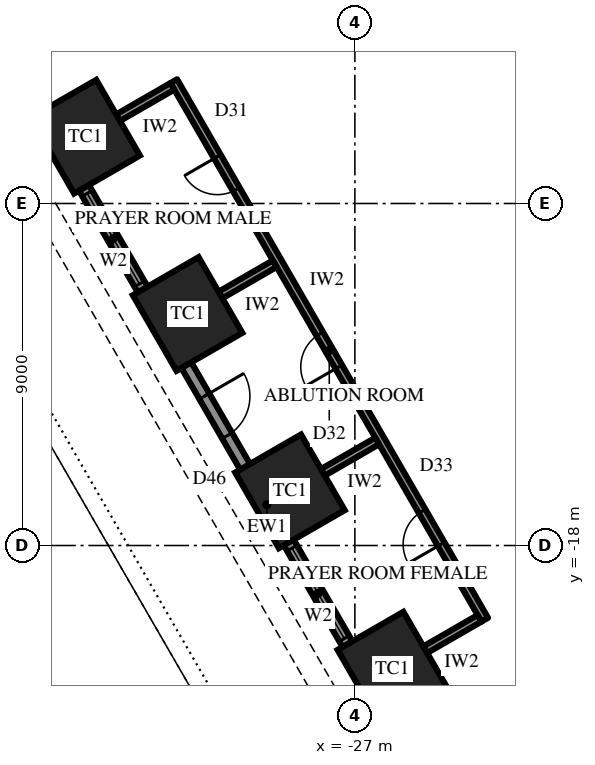
"""IFC4 building model, lengths in metres.
Left out: names, types, materials, properties, quantities, classifications, styles, units other than length and angle.
Written with IfcOpenShell. Run it as: python <this file> out.ifc"""

import sys

from ifc_helpers import new_model, si_unit, direction, frame, frame_2d, origin, origin_2d, place, context, subcontext, project, spatial, rectangle, extrude, element, fill, save


model = new_model("IFC4")
c1 = context("Model", 3, precision=1e-05, world=origin(), true_north=direction((0.0, 1.0)))
c2 = subcontext(c1, "Body", "Model", "MODEL_VIEW")
j1 = project(units=[si_unit("LENGTHUNIT", "METRE"), si_unit("PLANEANGLEUNIT", "RADIAN")], contexts=[c1])
p1 = place(None, origin())
s1 = spatial("IfcSite", under=j1, at=p1, CompositionType="ELEMENT")
p2 = place(p1, origin())
s2 = spatial("IfcBuilding", under=s1, at=p2, CompositionType="ELEMENT")
p3 = place(p2, frame((0.0, 0.0, 23.5)))
s3 = spatial("IfcBuildingStorey", under=s2, at=p3, CompositionType="ELEMENT", Elevation=23.5)
for number, where, z_axis, x_axis in (
    (1, (-34.097, -7.242, 0.0), (0.0, 0.0, 1.0), (0.5, -0.866, 0.0)),
    (2, (-31.403, -11.908, 0.0), (0.0, 0.0, 1.0), (0.5, -0.866, 0.0)),
    (3, (-28.709, -16.575, 0.0), (0.0, 0.0, 1.0), (0.5, -0.866, 0.0)),
    (4, (-26.014, -21.242, 0.0), (0.0, 0.0, 1.0), (0.5, -0.866, 0.0)),
):
    element("IfcColumn", number, at=place(p3, frame(where, z_axis=z_axis, x_axis=x_axis)), inside=s3, PredefinedType="COLUMN", context=c2, shape_type="SweptSolid", body=[
        extrude(rectangle(XDim=2.3, YDim=2.0, at=origin_2d()), origin(), (0.0, 0.0, 1.0), 4.2),
    ])
p4 = place(p3, frame((-37.398, -2.925, 0.0), z_axis=(0.0, 0.0, 1.0), x_axis=(0.499999163675, -0.866025886636, 0.0)))
e5 = element("IfcWall", 5, at=p4, inside=s3, PredefinedType="SOLIDWALL", context=c2, shape_type="SweptSolid", body=[
    extrude(rectangle(XDim=32.332, YDim=0.3, at=frame_2d((16.166, 0.0))), origin(), (0.0, 0.0, 1.0), 2.7),
])
p5 = place(p4, frame((1.319, 0.0, 0.6)))
e6 = element("IfcOpeningElement", 6, at=p5, cuts=e5, PredefinedType="OPENING", context=c2, shape_type="SweptSolid", body=[
    extrude(rectangle(XDim=2.75, YDim=1.85, at=frame_2d((1.375, 0.925))), frame((0.0, 0.16, 0.0), z_axis=(0.0, -1.0, 0.0), x_axis=(1.0, 0.0, 0.0)), (0.0, 0.0, 1.0), 0.32),
])
p6 = place(p4, frame((6.708, 0.0, 0.6)))
e7 = element("IfcOpeningElement", 7, at=p6, cuts=e5, PredefinedType="OPENING", context=c2, shape_type="SweptSolid", body=[
    extrude(rectangle(XDim=2.75, YDim=1.85, at=frame_2d((1.375, 0.925))), frame((0.0, 0.16, 0.0), z_axis=(0.0, -1.0, 0.0), x_axis=(1.0, 0.0, 0.0)), (0.0, 0.0, 1.0), 0.32),
])
p7 = place(p4, frame((12.872, 0.0, 0.0)))
e8 = element("IfcOpeningElement", 8, at=p7, cuts=e5, PredefinedType="OPENING", context=c2, shape_type="SweptSolid", body=[
    extrude(rectangle(XDim=1.2, YDim=2.4, at=frame_2d((0.6, 1.2))), frame((0.0, 0.16, 0.0), z_axis=(0.0, -1.0, 0.0), x_axis=(1.0, 0.0, 0.0)), (0.0, 0.0, 1.0), 0.32),
])
p8 = place(p4, frame((17.485, 0.0, 0.6)))
e9 = element("IfcOpeningElement", 9, at=p8, cuts=e5, PredefinedType="OPENING", context=c2, shape_type="SweptSolid", body=[
    extrude(rectangle(XDim=2.75, YDim=1.85, at=frame_2d((1.375, 0.925))), frame((0.0, 0.16, 0.0), z_axis=(0.0, -1.0, 0.0), x_axis=(1.0, 0.0, 0.0)), (0.0, 0.0, 1.0), 0.32),
])
p9 = place(p4, frame((22.874, 0.0, 0.6)))
e10 = element("IfcOpeningElement", 10, at=p9, cuts=e5, PredefinedType="OPENING", context=c2, shape_type="SweptSolid", body=[
    extrude(rectangle(XDim=2.75, YDim=1.85, at=frame_2d((1.375, 0.925))), frame((0.0, 0.16, 0.0), z_axis=(0.0, -1.0, 0.0), x_axis=(1.0, 0.0, 0.0)), (0.0, 0.0, 1.0), 0.32),
])
p10 = place(p4, frame((28.262, 0.0, 0.6)))
e11 = element("IfcOpeningElement", 11, at=p10, cuts=e5, PredefinedType="OPENING", context=c2, shape_type="SweptSolid", body=[
    extrude(rectangle(XDim=2.75, YDim=1.85, at=frame_2d((1.375, 0.925))), frame((0.0, 0.16, 0.0), z_axis=(0.0, -1.0, 0.0), x_axis=(1.0, 0.0, 0.0)), (0.0, 0.0, 1.0), 0.32),
])
p11 = place(p3, frame((-50.72, -3.95, 0.0), z_axis=(0.0, 0.0, 1.0), x_axis=(0.499998269459, -0.86602640291, 0.0)))
e12 = element("IfcWall", 12, at=p11, inside=s3, PredefinedType="PARAPET", context=c2, shape_type="SweptSolid", body=[
    extrude(rectangle(XDim=43.879, YDim=0.2, at=frame_2d((21.939, 0.0))), origin(), (0.0, 0.0, 1.0), 1.2),
])
p12 = place(p3, frame((-31.766, -5.78, 0.0), z_axis=(0.0, 0.0, 1.0), x_axis=(0.500005677665, -0.866022125758, 0.0)))
e13 = element("IfcWall", 13, at=p12, inside=s3, PredefinedType="PARTITIONING", context=c2, shape_type="SweptSolid", body=[
    extrude(rectangle(XDim=16.366, YDim=0.2, at=frame_2d((8.183, 0.0))), origin(), (0.0, 0.0, 1.0), 4.0),
])
p13 = place(p12, frame((2.294, 0.0, 0.0)))
e14 = element("IfcOpeningElement", 14, at=p13, cuts=e13, PredefinedType="OPENING", context=c2, shape_type="SweptSolid", body=[
    extrude(rectangle(XDim=1.0, YDim=2.2, at=frame_2d((0.5, 1.1))), frame((0.0, 0.11, 0.0), z_axis=(0.0, -1.0, 0.0), x_axis=(1.0, 0.0, 0.0)), (0.0, 0.0, 1.0), 0.22),
])
p14 = place(p12, frame((7.683, 0.0, 0.0)))
e15 = element("IfcOpeningElement", 15, at=p14, cuts=e13, PredefinedType="OPENING", context=c2, shape_type="SweptSolid", body=[
    extrude(rectangle(XDim=1.0, YDim=2.2, at=frame_2d((0.5, 1.1))), frame((0.0, 0.11, 0.0), z_axis=(0.0, -1.0, 0.0), x_axis=(1.0, 0.0, 0.0)), (0.0, 0.0, 1.0), 0.22),
])
p15 = place(p12, frame((13.072, 0.0, 0.0)))
e16 = element("IfcOpeningElement", 16, at=p15, cuts=e13, PredefinedType="OPENING", context=c2, shape_type="SweptSolid", body=[
    extrude(rectangle(XDim=1.0, YDim=2.2, at=frame_2d((0.5, 1.1))), frame((0.0, 0.11, 0.0), z_axis=(0.0, -1.0, 0.0), x_axis=(1.0, 0.0, 0.0)), (0.0, 0.0, 1.0), 0.22),
])
p16 = place(p3, frame((-31.802, -5.917, 0.0), z_axis=(0.0, 0.0, 1.0), x_axis=(-0.866003217194, -0.500038426333, 0.0)))
e17 = element("IfcWall", 17, at=p16, inside=s3, PredefinedType="PARTITIONING", context=c2, shape_type="SweptSolid", body=[
    extrude(rectangle(XDim=1.65, YDim=0.2, at=frame_2d((0.825, 0.0))), origin(), (0.0, 0.0, 1.0), 2.944),
])
p17 = place(p3, frame((-29.108, -10.583, 0.0), z_axis=(0.0, 0.0, 1.0), x_axis=(-0.865976140824, -0.500085316245, 0.0)))
e18 = element("IfcWall", 18, at=p17, inside=s3, PredefinedType="PARTITIONING", context=c2, shape_type="SweptSolid", body=[
    extrude(rectangle(XDim=1.65, YDim=0.2, at=frame_2d((0.825, 0.0))), origin(), (0.0, 0.0, 1.0), 2.944),
])
p18 = place(p3, frame((-26.414, -15.25, 0.0), z_axis=(0.0, 0.0, 1.0), x_axis=(-0.866040211805, -0.499974350878, 0.0)))
e19 = element("IfcWall", 19, at=p18, inside=s3, PredefinedType="PARTITIONING", context=c2, shape_type="SweptSolid", body=[
    extrude(rectangle(XDim=1.65, YDim=0.2, at=frame_2d((0.825, 0.0))), origin(), (0.0, 0.0, 1.0), 4.0),
])
p19 = place(p3, frame((-23.719, -19.917, 0.0), z_axis=(0.0, 0.0, 1.0), x_axis=(-0.866040211805, -0.499974350878, 0.0)))
e20 = element("IfcWall", 20, at=p19, inside=s3, PredefinedType="PARTITIONING", context=c2, shape_type="SweptSolid", body=[
    extrude(rectangle(XDim=1.65, YDim=0.2, at=frame_2d((0.825, 0.0))), origin(), (0.0, 0.0, 1.0), 2.992),
])
p20 = place(p6, origin())
e21 = element("IfcWindow", 21, at=p20, inside=s3, PartitioningType="SINGLE_PANEL", PredefinedType="WINDOW", context=c2, shape_type="SweptSolid", body=[
    extrude(rectangle(XDim=2.75, YDim=1.85, at=frame_2d((1.375, 0.925))), frame((0.0, 0.03, 0.0), z_axis=(0.0, -1.0, 0.0), x_axis=(1.0, 0.0, 0.0)), (0.0, 0.0, 1.0), 0.06),
])
fill(e7, e21)
p21 = place(p7, origin())
e22 = element("IfcDoor", 22, at=p21, inside=s3, OperationType="SINGLE_SWING_RIGHT", PredefinedType="DOOR", context=c2, shape_type="SweptSolid", body=[
    extrude(rectangle(XDim=1.2, YDim=2.4, at=frame_2d((0.6, 1.2))), frame((0.0, 0.025, 0.0), z_axis=(0.0, -1.0, 0.0), x_axis=(1.0, 0.0, 0.0)), (0.0, 0.0, 1.0), 0.05),
])
fill(e8, e22)
p22 = place(p8, origin())
e23 = element("IfcWindow", 23, at=p22, inside=s3, PartitioningType="SINGLE_PANEL", PredefinedType="WINDOW", context=c2, shape_type="SweptSolid", body=[
    extrude(rectangle(XDim=2.75, YDim=1.85, at=frame_2d((1.375, 0.925))), frame((0.0, 0.03, 0.0), z_axis=(0.0, -1.0, 0.0), x_axis=(1.0, 0.0, 0.0)), (0.0, 0.0, 1.0), 0.06),
])
fill(e9, e23)
p23 = place(p13, frame((1.0, 0.0, 0.0), z_axis=(0.0, 0.0, 1.0), x_axis=(-1.0, 0.0, 0.0)))
e24 = element("IfcDoor", 24, at=p23, inside=s3, OperationType="SINGLE_SWING_LEFT", PredefinedType="DOOR", context=c2, shape_type="SweptSolid", body=[
    extrude(rectangle(XDim=1.0, YDim=2.2, at=frame_2d((0.5, 1.1))), frame((0.0, 0.025, 0.0), z_axis=(0.0, -1.0, 0.0), x_axis=(1.0, 0.0, 0.0)), (0.0, 0.0, 1.0), 0.05),
])
fill(e14, e24)
p24 = place(p14, frame((1.0, 0.0, 0.0), z_axis=(0.0, 0.0, 1.0), x_axis=(-1.0, 0.0, 0.0)))
e25 = element("IfcDoor", 25, at=p24, inside=s3, OperationType="SINGLE_SWING_RIGHT", PredefinedType="DOOR", context=c2, shape_type="SweptSolid", body=[
    extrude(rectangle(XDim=1.0, YDim=2.2, at=frame_2d((0.5, 1.1))), frame((0.0, 0.025, 0.0), z_axis=(0.0, -1.0, 0.0), x_axis=(1.0, 0.0, 0.0)), (0.0, 0.0, 1.0), 0.05),
])
fill(e15, e25)
p25 = place(p15, frame((1.0, 0.0, 0.0), z_axis=(0.0, 0.0, 1.0), x_axis=(-1.0, 0.0, 0.0)))
e26 = element("IfcDoor", 26, at=p25, inside=s3, OperationType="SINGLE_SWING_RIGHT", PredefinedType="DOOR", context=c2, shape_type="SweptSolid", body=[
    extrude(rectangle(XDim=1.0, YDim=2.2, at=frame_2d((0.5, 1.1))), frame((0.0, 0.025, 0.0), z_axis=(0.0, -1.0, 0.0), x_axis=(1.0, 0.0, 0.0)), (0.0, 0.0, 1.0), 0.05),
])
fill(e16, e26)
save(model, sys.argv[1])
